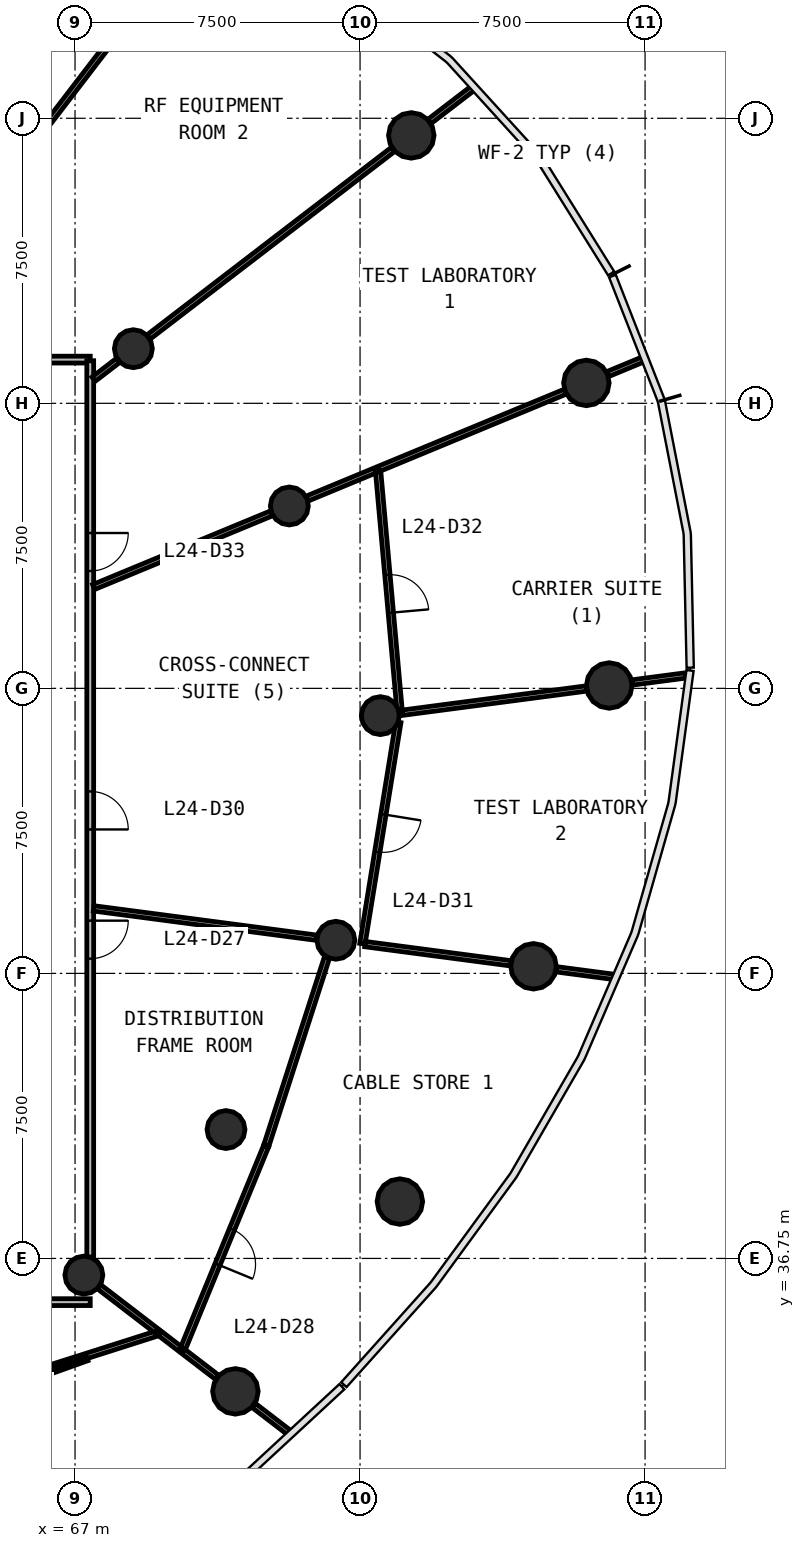
"""IFC4 building model, lengths in metres.
Left out: names, types, materials, properties, quantities, classifications, styles, units other than length and angle.
Written with IfcOpenShell. Run it as: python <this file> out.ifc"""

import sys

from ifc_helpers import new_model, si_unit, direction, frame, frame_2d, origin, origin_2d, place, context, subcontext, project, spatial, rectangle, circle, extrude, source, transform, mapped, element, fill, save


model = new_model("IFC4")
c1 = context("Model", 3, precision=1e-05, world=origin(), true_north=direction((0.0, 1.0)))
c2 = subcontext(c1, "Body", "Model", "MODEL_VIEW")
j1 = project(units=[si_unit("LENGTHUNIT", "METRE"), si_unit("PLANEANGLEUNIT", "RADIAN")], contexts=[c1])
p1 = place(None, origin())
s1 = spatial("IfcSite", under=j1, at=p1, CompositionType="ELEMENT")
p2 = place(p1, origin())
s2 = spatial("IfcBuilding", under=s1, at=p2, CompositionType="ELEMENT")
p3 = place(p2, frame((0.0, 0.0, 104.4)))
s3 = spatial("IfcBuildingStorey", under=s2, at=p3, CompositionType="ELEMENT", Elevation=104.4)
m1 = source(origin(), c2, "Body", "SweptSolid", [
    extrude(circle(Radius=0.6, at=origin_2d()), origin(), (0.0, 0.0, 1.0), 4.1),
])
for number, where, z_axis, x_axis in (
    (1, (81.056, 51.825, 0.0), (0.0, 0.0, 1.0), (1.0, 0.0, 0.0)),
    (2, (80.456, 59.787, 0.0), (0.0, 0.0, 1.0), (1.0, 0.0, 0.0)),
    (3, (75.848, 66.299, 0.0), (0.0, 0.0, 1.0), (1.0, 0.0, 0.0)),
    (4, (71.22, 33.252, 0.0), (0.0, 0.0, 1.0), (1.0, 0.0, 0.0)),
    (5, (75.548, 38.246, 0.0), (0.0, 0.0, 1.0), (1.0, 0.0, 0.0)),
    (6, (79.064, 44.437, 0.0), (0.0, 0.0, 1.0), (1.0, 0.0, 0.0)),
):
    element("IfcColumn", number, at=place(p3, frame(where, z_axis=z_axis, x_axis=x_axis)), inside=s3, PredefinedType="COLUMN", context=c2, shape_type="MappedRepresentation", body=[
        mapped(m1, transform((0.0, 0.0, 0.0), scale=1.0)),
    ])
m2 = source(origin(), c2, "Body", "SweptSolid", [
    extrude(circle(Radius=0.5, at=origin_2d()), origin(), (0.0, 0.0, 1.0), 4.1),
])
for number, where, z_axis, x_axis in (
    (7, (75.034, 51.032, 0.0), (0.0, 0.0, 1.0), (1.0, 0.0, 0.0)),
    (8, (72.639, 56.549, 0.0), (0.0, 0.0, 1.0), (1.0, 0.0, 0.0)),
    (9, (68.535, 60.688, 0.0), (0.0, 0.0, 1.0), (1.0, 0.0, 0.0)),
    (10, (67.232, 36.312, 0.0), (0.0, 0.0, 1.0), (1.0, 0.0, 0.0)),
    (11, (70.972, 40.141, 0.0), (0.0, 0.0, 1.0), (1.0, 0.0, 0.0)),
    (12, (73.863, 45.122, 0.0), (0.0, 0.0, 1.0), (1.0, 0.0, 0.0)),
):
    element("IfcColumn", number, at=place(p3, frame(where, z_axis=z_axis, x_axis=x_axis)), inside=s3, PredefinedType="COLUMN", context=c2, shape_type="MappedRepresentation", body=[
        mapped(m2, transform((0.0, 0.0, 0.0), scale=1.0)),
    ])
p4 = place(p3, frame((67.4, 35.6, 0.0), z_axis=(0.0, 0.0, 1.0), x_axis=(-1.0, 0.0, 0.0)))
e13 = element("IfcWall", 13, at=p4, inside=s3, PredefinedType="PARTITIONING", context=c2, shape_type="SweptSolid", body=[
    extrude(rectangle(XDim=30.8, YDim=0.18, at=frame_2d((15.4, 0.0))), origin(), (0.0, 0.0, 1.0), 2.9),
])
p5 = place(p4, frame((9.05, 0.0, 0.0)))
e14 = element("IfcOpeningElement", 14, at=p5, cuts=e13, PredefinedType="OPENING", context=c2, shape_type="SweptSolid", body=[
    extrude(rectangle(XDim=0.9, YDim=2.1, at=frame_2d((0.45, 1.05))), frame((0.0, 0.1, 0.0), z_axis=(0.0, -1.0, 0.0), x_axis=(1.0, 0.0, 0.0)), (0.0, 0.0, 1.0), 0.2),
])
p6 = place(p4, frame((6.05, 0.0, 0.0)))
e15 = element("IfcOpeningElement", 15, at=p6, cuts=e13, PredefinedType="OPENING", context=c2, shape_type="SweptSolid", body=[
    extrude(rectangle(XDim=0.9, YDim=2.1, at=frame_2d((0.45, 1.05))), frame((0.0, 0.1, 0.0), z_axis=(0.0, -1.0, 0.0), x_axis=(1.0, 0.0, 0.0)), (0.0, 0.0, 1.0), 0.2),
])
p7 = place(p4, frame((2.45, 0.0, 0.0)))
e16 = element("IfcOpeningElement", 16, at=p7, cuts=e13, PredefinedType="OPENING", context=c2, shape_type="SweptSolid", body=[
    extrude(rectangle(XDim=0.9, YDim=2.1, at=frame_2d((0.45, 1.05))), frame((0.0, 0.1, 0.0), z_axis=(0.0, -1.0, 0.0), x_axis=(1.0, 0.0, 0.0)), (0.0, 0.0, 1.0), 0.2),
])
p8 = place(p4, frame((20.95, 0.0, 0.0)))
e17 = element("IfcOpeningElement", 17, at=p8, cuts=e13, PredefinedType="OPENING", context=c2, shape_type="SweptSolid", body=[
    extrude(rectangle(XDim=1.0, YDim=2.1, at=frame_2d((0.5, 1.05))), frame((0.0, 0.1, 0.0), z_axis=(0.0, -1.0, 0.0), x_axis=(1.0, 0.0, 0.0)), (0.0, 0.0, 1.0), 0.2),
])
p9 = place(p4, frame((14.95, 0.0, 0.0)))
e18 = element("IfcOpeningElement", 18, at=p9, cuts=e13, PredefinedType="OPENING", context=c2, shape_type="SweptSolid", body=[
    extrude(rectangle(XDim=1.0, YDim=2.1, at=frame_2d((0.5, 1.05))), frame((0.0, 0.1, 0.0), z_axis=(0.0, -1.0, 0.0), x_axis=(1.0, 0.0, 0.0)), (0.0, 0.0, 1.0), 0.2),
])
p10 = place(p4, frame((12.55, 0.0, 0.0)))
e19 = element("IfcOpeningElement", 19, at=p10, cuts=e13, PredefinedType="OPENING", context=c2, shape_type="SweptSolid", body=[
    extrude(rectangle(XDim=1.0, YDim=2.1, at=frame_2d((0.5, 1.05))), frame((0.0, 0.1, 0.0), z_axis=(0.0, -1.0, 0.0), x_axis=(1.0, 0.0, 0.0)), (0.0, 0.0, 1.0), 0.2),
])
p11 = place(p3, frame((36.6, 60.4, 0.0), z_axis=(0.0, 0.0, 1.0), x_axis=(1.0, 0.0, 0.0)))
e20 = element("IfcWall", 20, at=p11, inside=s3, PredefinedType="PARTITIONING", context=c2, shape_type="SweptSolid", body=[
    extrude(rectangle(XDim=30.8, YDim=0.18, at=frame_2d((15.4, 0.0))), origin(), (0.0, 0.0, 1.0), 2.9),
])
p12 = place(p11, frame((25.55, 0.0, 0.0)))
e21 = element("IfcOpeningElement", 21, at=p12, cuts=e20, PredefinedType="OPENING", context=c2, shape_type="SweptSolid", body=[
    extrude(rectangle(XDim=1.0, YDim=2.1, at=frame_2d((0.5, 1.05))), frame((0.0, 0.1, 0.0), z_axis=(0.0, -1.0, 0.0), x_axis=(1.0, 0.0, 0.0)), (0.0, 0.0, 1.0), 0.2),
])
p13 = place(p11, frame((20.95, 0.0, 0.0)))
e22 = element("IfcOpeningElement", 22, at=p13, cuts=e20, PredefinedType="OPENING", context=c2, shape_type="SweptSolid", body=[
    extrude(rectangle(XDim=1.0, YDim=2.1, at=frame_2d((0.5, 1.05))), frame((0.0, 0.1, 0.0), z_axis=(0.0, -1.0, 0.0), x_axis=(1.0, 0.0, 0.0)), (0.0, 0.0, 1.0), 0.2),
])
p14 = place(p11, frame((14.95, 0.0, 0.0)))
e23 = element("IfcOpeningElement", 23, at=p14, cuts=e20, PredefinedType="OPENING", context=c2, shape_type="SweptSolid", body=[
    extrude(rectangle(XDim=1.0, YDim=2.1, at=frame_2d((0.5, 1.05))), frame((0.0, 0.1, 0.0), z_axis=(0.0, -1.0, 0.0), x_axis=(1.0, 0.0, 0.0)), (0.0, 0.0, 1.0), 0.2),
])
p15 = place(p11, frame((8.95, 0.0, 0.0)))
e24 = element("IfcOpeningElement", 24, at=p15, cuts=e20, PredefinedType="OPENING", context=c2, shape_type="SweptSolid", body=[
    extrude(rectangle(XDim=1.0, YDim=2.1, at=frame_2d((0.5, 1.05))), frame((0.0, 0.1, 0.0), z_axis=(0.0, -1.0, 0.0), x_axis=(1.0, 0.0, 0.0)), (0.0, 0.0, 1.0), 0.2),
])
p16 = place(p3, frame((67.4, 60.37, 0.0), z_axis=(0.0, 0.0, 1.0), x_axis=(0.0, -1.0, 0.0)))
e25 = element("IfcWall", 25, at=p16, inside=s3, PredefinedType="PARTITIONING", context=c2, shape_type="SweptSolid", body=[
    extrude(rectangle(XDim=23.583, YDim=0.18, at=frame_2d((11.791, 0.0))), origin(), (0.0, 0.0, 1.0), 2.9),
])
p17 = place(p16, frame((14.732, 0.0, 0.0)))
e26 = element("IfcOpeningElement", 26, at=p17, cuts=e25, PredefinedType="OPENING", context=c2, shape_type="SweptSolid", body=[
    extrude(rectangle(XDim=1.0, YDim=2.1, at=frame_2d((0.5, 1.05))), frame((0.0, 0.1, 0.0), z_axis=(0.0, -1.0, 0.0), x_axis=(1.0, 0.0, 0.0)), (0.0, 0.0, 1.0), 0.2),
])
p18 = place(p16, frame((11.333, 0.0, 0.0)))
e27 = element("IfcOpeningElement", 27, at=p18, cuts=e25, PredefinedType="OPENING", context=c2, shape_type="SweptSolid", body=[
    extrude(rectangle(XDim=1.0, YDim=2.1, at=frame_2d((0.5, 1.05))), frame((0.0, 0.1, 0.0), z_axis=(0.0, -1.0, 0.0), x_axis=(1.0, 0.0, 0.0)), (0.0, 0.0, 1.0), 0.2),
])
p19 = place(p16, frame((4.532, 0.0, 0.0)))
e28 = element("IfcOpeningElement", 28, at=p19, cuts=e25, PredefinedType="OPENING", context=c2, shape_type="SweptSolid", body=[
    extrude(rectangle(XDim=1.0, YDim=2.1, at=frame_2d((0.5, 1.05))), frame((0.0, 0.1, 0.0), z_axis=(0.0, -1.0, 0.0), x_axis=(1.0, 0.0, 0.0)), (0.0, 0.0, 1.0), 0.2),
])
p20 = place(p3, frame((68.935, 60.995, 0.0), z_axis=(0.0, 0.0, 1.0), x_axis=(0.793358692504, 0.608754453805, 0.0)))
e29 = element("IfcWall", 29, at=p20, inside=s3, PredefinedType="PARTITIONING", context=c2, shape_type="SweptSolid", body=[
    extrude(rectangle(XDim=8.11, YDim=0.14, at=frame_2d((4.055, 0.0))), origin(), (0.0, 0.0, 1.0), 2.9),
])
p21 = place(p3, frame((64.142, 63.824, 0.0), z_axis=(0.0, 0.0, 1.0), x_axis=(0.608755907151, 0.793357577331, 0.0)))
e30 = element("IfcWall", 30, at=p21, inside=s3, PredefinedType="PARTITIONING", context=c2, shape_type="SweptSolid", body=[
    extrude(rectangle(XDim=7.615, YDim=0.14, at=frame_2d((3.808, 0.0))), origin(), (0.0, 0.0, 1.0), 2.9),
])
p22 = place(p3, frame((74.97, 57.515, 0.0), z_axis=(0.0, 0.0, 1.0), x_axis=(0.089462467016, -0.995990194227, 0.0)))
e31 = element("IfcWall", 31, at=p22, inside=s3, PredefinedType="PARTITIONING", context=c2, shape_type="SweptSolid", body=[
    extrude(rectangle(XDim=6.44, YDim=0.14, at=frame_2d((3.22, 0.0))), origin(), (0.0, 0.0, 1.0), 2.9),
])
p23 = place(p22, frame((2.791, 0.0, 0.0)))
e32 = element("IfcOpeningElement", 32, at=p23, cuts=e31, PredefinedType="OPENING", context=c2, shape_type="SweptSolid", body=[
    extrude(rectangle(XDim=1.0, YDim=2.1, at=frame_2d((0.5, 1.05))), frame((0.0, 0.08, 0.0), z_axis=(0.0, -1.0, 0.0), x_axis=(1.0, 0.0, 0.0)), (0.0, 0.0, 1.0), 0.16),
])
p24 = place(p3, frame((67.49, 45.961, 0.0), z_axis=(0.0, 0.0, 1.0), x_axis=(0.991445034615, -0.130524876315, 0.0)))
e33 = element("IfcWall", 33, at=p24, inside=s3, PredefinedType="PARTITIONING", context=c2, shape_type="SweptSolid", body=[
    extrude(rectangle(XDim=5.924, YDim=0.14, at=frame_2d((2.962, 0.0))), origin(), (0.0, 0.0, 1.0), 2.9),
])
p25 = place(p3, frame((63.525, 32.98, 0.0), z_axis=(0.0, 0.0, 1.0), x_axis=(0.952796236259, 0.303610494172, 0.0)))
e34 = element("IfcWall", 34, at=p25, inside=s3, PredefinedType="PARTITIONING", context=c2, shape_type="SweptSolid", body=[
    extrude(rectangle(XDim=5.969, YDim=0.14, at=frame_2d((2.984, 0.0))), origin(), (0.0, 0.0, 1.0), 2.9),
])
p26 = place(p3, frame((75.507, 50.858, 0.0), z_axis=(0.0, 0.0, 1.0), x_axis=(-0.160052648202, -0.987108479248, 0.0)))
e35 = element("IfcWall", 35, at=p26, inside=s3, PredefinedType="PARTITIONING", context=c2, shape_type="SweptSolid", body=[
    extrude(rectangle(XDim=5.905, YDim=0.14, at=frame_2d((2.952, 0.0))), origin(), (0.0, 0.0, 1.0), 2.9),
])
p27 = place(p26, frame((2.455, 0.0, 0.0)))
e36 = element("IfcOpeningElement", 36, at=p27, cuts=e35, PredefinedType="OPENING", context=c2, shape_type="SweptSolid", body=[
    extrude(rectangle(XDim=1.0, YDim=2.1, at=frame_2d((0.5, 1.05))), frame((0.0, 0.08, 0.0), z_axis=(0.0, -1.0, 0.0), x_axis=(1.0, 0.0, 0.0)), (0.0, 0.0, 1.0), 0.16),
])
p28 = place(p3, frame((72.028, 39.704, 0.0), z_axis=(0.0, 0.0, 1.0), x_axis=(-0.380042060719, -0.92496920602, 0.0)))
e37 = element("IfcWall", 37, at=p28, inside=s3, PredefinedType="PARTITIONING", context=c2, shape_type="SweptSolid", body=[
    extrude(rectangle(XDim=5.813, YDim=0.14, at=frame_2d((2.907, 0.0))), origin(), (0.0, 0.0, 1.0), 2.9),
])
p29 = place(p28, frame((2.363, 0.0, 0.0)))
e38 = element("IfcOpeningElement", 38, at=p29, cuts=e37, PredefinedType="OPENING", context=c2, shape_type="SweptSolid", body=[
    extrude(rectangle(XDim=1.0, YDim=2.1, at=frame_2d((0.5, 1.05))), frame((0.0, 0.08, 0.0), z_axis=(0.0, -1.0, 0.0), x_axis=(1.0, 0.0, 0.0)), (0.0, 0.0, 1.0), 0.16),
])
p30 = place(p3, frame((74.998, 57.526, 0.0), z_axis=(0.0, 0.0, 1.0), x_axis=(0.923875965801, 0.382692043051, 0.0)))
e39 = element("IfcWall", 39, at=p30, inside=s3, PredefinedType="PARTITIONING", context=c2, shape_type="SweptSolid", body=[
    extrude(rectangle(XDim=5.302, YDim=0.14, at=frame_2d((2.651, 0.0))), origin(), (0.0, 0.0, 1.0), 2.9),
])
p31 = place(p3, frame((72.037, 39.733, 0.0), z_axis=(0.0, 0.0, 1.0), x_axis=(0.307028885335, 0.951700196265, 0.0)))
e40 = element("IfcWall", 40, at=p31, inside=s3, PredefinedType="PARTITIONING", context=c2, shape_type="SweptSolid", body=[
    extrude(rectangle(XDim=5.192, YDim=0.14, at=frame_2d((2.596, 0.0))), origin(), (0.0, 0.0, 1.0), 2.9),
])
p32 = place(p3, frame((67.49, 54.416, 0.0), z_axis=(0.0, 0.0, 1.0), x_axis=(0.923890025086, 0.382658100067, 0.0)))
e41 = element("IfcWall", 41, at=p32, inside=s3, PredefinedType="PARTITIONING", context=c2, shape_type="SweptSolid", body=[
    extrude(rectangle(XDim=5.068, YDim=0.14, at=frame_2d((2.534, 0.0))), origin(), (0.0, 0.0, 1.0), 2.9),
])
p33 = place(p3, frame((75.616, 51.109, 0.0), z_axis=(0.0, 0.0, 1.0), x_axis=(0.991441867731, 0.130548929177, 0.0)))
e42 = element("IfcWall", 42, at=p33, inside=s3, PredefinedType="PARTITIONING", context=c2, shape_type="SweptSolid", body=[
    extrude(rectangle(XDim=4.883, YDim=0.14, at=frame_2d((2.441, 0.0))), origin(), (0.0, 0.0, 1.0), 2.9),
])
p34 = place(p3, frame((74.632, 45.021, 0.0), z_axis=(0.0, 0.0, 1.0), x_axis=(0.991447632366, -0.130505142718, 0.0)))
e43 = element("IfcWall", 43, at=p34, inside=s3, PredefinedType="PARTITIONING", context=c2, shape_type="SweptSolid", body=[
    extrude(rectangle(XDim=3.867, YDim=0.14, at=frame_2d((1.933, 0.0))), origin(), (0.0, 0.0, 1.0), 2.9),
])
p35 = place(p3, frame((73.106, 56.742, 0.0), z_axis=(0.0, 0.0, 1.0), x_axis=(0.923843914347, 0.382769410904, 0.0)))
e44 = element("IfcWall", 44, at=p35, inside=s3, PredefinedType="PARTITIONING", context=c2, shape_type="SweptSolid", body=[
    extrude(rectangle(XDim=1.945, YDim=0.14, at=frame_2d((0.972, 0.0))), origin(), (0.0, 0.0, 1.0), 2.9),
])
p36 = place(p3, frame((67.633, 36.005, 0.0), z_axis=(0.0, 0.0, 1.0), x_axis=(0.79330932609, -0.608818785139, 0.0)))
e45 = element("IfcWall", 45, at=p36, inside=s3, PredefinedType="PARTITIONING", context=c2, shape_type="SweptSolid", body=[
    extrude(rectangle(XDim=1.906, YDim=0.14, at=frame_2d((0.953, 0.0))), origin(), (0.0, 0.0, 1.0), 2.9),
])
p37 = place(p3, frame((79.664, 44.358, 0.0), z_axis=(0.0, 0.0, 1.0), x_axis=(0.991447745975, -0.130504279629, 0.0)))
e46 = element("IfcWall", 46, at=p37, inside=s3, PredefinedType="PARTITIONING", context=c2, shape_type="SweptSolid", body=[
    extrude(rectangle(XDim=1.523, YDim=0.14, at=frame_2d((0.761, 0.0))), origin(), (0.0, 0.0, 1.0), 2.9),
])
p38 = place(p3, frame((76.328, 66.667, 0.0), z_axis=(0.0, 0.0, 1.0), x_axis=(0.793384012646, 0.608721453932, 0.0)))
e47 = element("IfcWall", 47, at=p38, inside=s3, PredefinedType="PARTITIONING", context=c2, shape_type="SweptSolid", body=[
    extrude(rectangle(XDim=1.432, YDim=0.14, at=frame_2d((0.716, 0.0))), origin(), (0.0, 0.0, 1.0), 2.9),
])
p39 = place(p3, frame((81.656, 51.904, 0.0), z_axis=(0.0, 0.0, 1.0), x_axis=(0.991440859851, 0.130556583206, 0.0)))
e48 = element("IfcWall", 48, at=p39, inside=s3, PredefinedType="PARTITIONING", context=c2, shape_type="SweptSolid", body=[
    extrude(rectangle(XDim=1.423, YDim=0.14, at=frame_2d((0.711, 0.0))), origin(), (0.0, 0.0, 1.0), 2.9),
])
p40 = place(p3, frame((71.699, 32.884, 0.0), z_axis=(0.0, 0.0, 1.0), x_axis=(0.793332880396, -0.608788091935, 0.0)))
e49 = element("IfcWall", 49, at=p40, inside=s3, PredefinedType="PARTITIONING", context=c2, shape_type="SweptSolid", body=[
    extrude(rectangle(XDim=1.164, YDim=0.14, at=frame_2d((0.582, 0.0))), origin(), (0.0, 0.0, 1.0), 2.9),
])
p41 = place(p3, frame((69.843, 34.309, 0.0), z_axis=(0.0, 0.0, 1.0), x_axis=(0.793321446023, -0.608802992174, 0.0)))
e50 = element("IfcWall", 50, at=p41, inside=s3, PredefinedType="PARTITIONING", context=c2, shape_type="SweptSolid", body=[
    extrude(rectangle(XDim=1.131, YDim=0.14, at=frame_2d((0.566, 0.0))), origin(), (0.0, 0.0, 1.0), 2.9),
])
p42 = place(p3, frame((81.014, 60.018, 0.0), z_axis=(0.0, 0.0, 1.0), x_axis=(0.923909071339, 0.38261211154, 0.0)))
e51 = element("IfcWall", 51, at=p42, inside=s3, PredefinedType="PARTITIONING", context=c2, shape_type="SweptSolid", body=[
    extrude(rectangle(XDim=1.021, YDim=0.14, at=frame_2d((0.511, 0.0))), origin(), (0.0, 0.0, 1.0), 2.9),
])
p43 = place(p3, frame((67.49, 59.886, 0.0), z_axis=(0.0, 0.0, 1.0), x_axis=(0.793316076519, 0.608809989025, 0.0)))
e52 = element("IfcWall", 52, at=p43, inside=s3, PredefinedType="PARTITIONING", context=c2, shape_type="SweptSolid", body=[
    extrude(rectangle(XDim=0.812, YDim=0.14, at=frame_2d((0.406, 0.0))), origin(), (0.0, 0.0, 1.0), 2.9),
])
p44 = place(p3, frame((69.236, 34.774, 0.0), z_axis=(0.0, 0.0, 1.0), x_axis=(0.793363129336, -0.608748671465, 0.0)))
e53 = element("IfcWall", 53, at=p44, inside=s3, PredefinedType="PARTITIONING", context=c2, shape_type="SweptSolid", body=[
    extrude(rectangle(XDim=0.663, YDim=0.14, at=frame_2d((0.331, 0.0))), origin(), (0.0, 0.0, 1.0), 2.9),
])
p45 = place(p3, frame((65.363, 33.417, 0.0), z_axis=(0.0, 0.0, 1.0), x_axis=(0.941622213284, 0.336671364166, 0.0)))
e54 = element("IfcWall", 54, at=p45, inside=s3, PredefinedType="PARTITIONING", context=c2, shape_type="SweptSolid", body=[
    extrude(rectangle(XDim=2.078, YDim=0.12, at=frame_2d((1.039, 0.0))), origin(), (0.0, 0.0, 1.0), 2.9),
])
m3 = source(origin(), c2, "Body", "SweptSolid", [
    extrude(rectangle(XDim=1.0, YDim=2.1, at=frame_2d((0.5, 1.05))), frame((0.0, 0.025, 0.0), z_axis=(0.0, -1.0, 0.0), x_axis=(1.0, 0.0, 0.0)), (0.0, 0.0, 1.0), 0.05),
])
p46 = place(p17, origin())
e55 = element("IfcDoor", 55, at=p46, inside=s3, OperationType="SINGLE_SWING_LEFT", PredefinedType="DOOR", context=c2, shape_type="MappedRepresentation", body=[
    mapped(m3, transform((0.0, 0.0, 0.0), scale=1.0)),
])
fill(e26, e55)
p47 = place(p29, origin())
e56 = element("IfcDoor", 56, at=p47, inside=s3, OperationType="SINGLE_SWING_RIGHT", PredefinedType="DOOR", context=c2, shape_type="MappedRepresentation", body=[
    mapped(m3, transform((0.0, 0.0, 0.0), scale=1.0)),
])
fill(e38, e56)
p48 = place(p18, origin())
e57 = element("IfcDoor", 57, at=p48, inside=s3, OperationType="SINGLE_SWING_RIGHT", PredefinedType="DOOR", context=c2, shape_type="MappedRepresentation", body=[
    mapped(m3, transform((0.0, 0.0, 0.0), scale=1.0)),
])
fill(e27, e57)
p49 = place(p27, origin())
e58 = element("IfcDoor", 58, at=p49, inside=s3, OperationType="SINGLE_SWING_LEFT", PredefinedType="DOOR", context=c2, shape_type="MappedRepresentation", body=[
    mapped(m3, transform((0.0, 0.0, 0.0), scale=1.0)),
])
fill(e36, e58)
p50 = place(p23, origin())
e59 = element("IfcDoor", 59, at=p50, inside=s3, OperationType="SINGLE_SWING_RIGHT", PredefinedType="DOOR", context=c2, shape_type="MappedRepresentation", body=[
    mapped(m3, transform((0.0, 0.0, 0.0), scale=1.0)),
])
fill(e32, e59)
p51 = place(p19, origin())
e60 = element("IfcDoor", 60, at=p51, inside=s3, OperationType="SINGLE_SWING_LEFT", PredefinedType="DOOR", context=c2, shape_type="MappedRepresentation", body=[
    mapped(m3, transform((0.0, 0.0, 0.0), scale=1.0)),
])
fill(e28, e60)
save(model, sys.argv[1])
